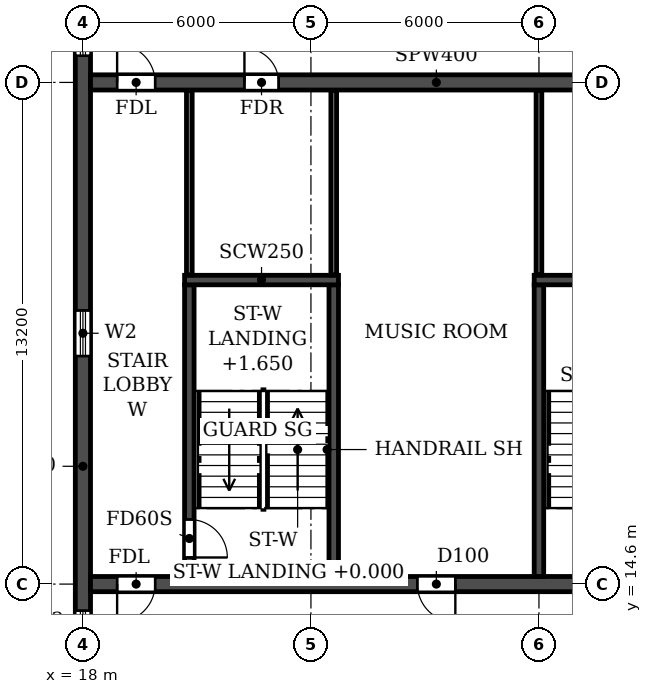
"""IFC4 building model, lengths in metres.
Left out: names, types, materials, properties, quantities, classifications, styles, units other than length and angle.
Written with IfcOpenShell. Run it as: python <this file> out.ifc"""

import sys

from ifc_helpers import new_model, si_unit, direction, frame, frame_2d, origin, place, context, subcontext, project, spatial, rectangle, extrude, element, fill, save


model = new_model("IFC4")
c1 = context("Model", 3, precision=1e-05, world=origin(), true_north=direction((0.0, 1.0)))
c2 = subcontext(c1, "Body", "Model", "MODEL_VIEW")
j1 = project(units=[si_unit("LENGTHUNIT", "METRE"), si_unit("PLANEANGLEUNIT", "RADIAN")], contexts=[c1])
p1 = place(None, origin())
s1 = spatial("IfcSite", under=j1, at=p1, CompositionType="ELEMENT")
p2 = place(p1, origin())
s2 = spatial("IfcBuilding", under=s1, at=p2, CompositionType="ELEMENT")
p3 = place(p2, frame((0.0, 0.0, 171.9)))
s3 = spatial("IfcBuildingStorey", under=s2, at=p3, CompositionType="ELEMENT", Elevation=171.9)
p4 = place(p3, frame((18.0, 4.683, 0.0), z_axis=(0.0, 0.0, 1.0), x_axis=(0.0, 1.0, 0.0)))
e1 = element("IfcWall", 1, at=p4, inside=s3, PredefinedType="SHEAR", context=c2, shape_type="SweptSolid", body=[
    extrude(rectangle(XDim=31.834, YDim=0.4, at=frame_2d((15.917, 0.0))), origin(), (0.0, 0.0, 1.0), 3.08),
])
p5 = place(p4, frame((23.817, 0.0, 0.9)))
e2 = element("IfcOpeningElement", 2, at=p5, cuts=e1, PredefinedType="OPENING", context=c2, shape_type="SweptSolid", body=[
    extrude(rectangle(XDim=1.2, YDim=1.5, at=frame_2d((0.6, 0.75))), frame((0.0, 0.21, 0.0), z_axis=(0.0, -1.0, 0.0), x_axis=(1.0, 0.0, 0.0)), (0.0, 0.0, 1.0), 0.42),
])
p6 = place(p4, frame((8.017, 0.0, 0.9)))
e3 = element("IfcOpeningElement", 3, at=p6, cuts=e1, PredefinedType="OPENING", context=c2, shape_type="SweptSolid", body=[
    extrude(rectangle(XDim=1.2, YDim=1.5, at=frame_2d((0.6, 0.75))), frame((0.0, 0.21, 0.0), z_axis=(0.0, -1.0, 0.0), x_axis=(1.0, 0.0, 0.0)), (0.0, 0.0, 1.0), 0.42),
])
p7 = place(p4, frame((27.694, 0.0, 0.6)))
e4 = element("IfcOpeningElement", 4, at=p7, cuts=e1, PredefinedType="OPENING", context=c2, shape_type="SweptSolid", body=[
    extrude(rectangle(XDim=2.2, YDim=1.8, at=frame_2d((1.1, 0.9))), frame((0.0, 0.21, 0.0), z_axis=(0.0, -1.0, 0.0), x_axis=(1.0, 0.0, 0.0)), (0.0, 0.0, 1.0), 0.42),
])
p8 = place(p4, frame((2.541, 0.0, 0.6)))
e5 = element("IfcOpeningElement", 5, at=p8, cuts=e1, PredefinedType="OPENING", context=c2, shape_type="SweptSolid", body=[
    extrude(rectangle(XDim=2.2, YDim=1.8, at=frame_2d((1.1, 0.9))), frame((0.0, 0.21, 0.0), z_axis=(0.0, -1.0, 0.0), x_axis=(1.0, 0.0, 0.0)), (0.0, 0.0, 1.0), 0.42),
])
p9 = place(p4, frame((15.917, 0.0, 0.9)))
e6 = element("IfcOpeningElement", 6, at=p9, cuts=e1, PredefinedType="OPENING", context=c2, shape_type="SweptSolid", body=[
    extrude(rectangle(XDim=1.2, YDim=1.5, at=frame_2d((0.6, 0.75))), frame((0.0, 0.21, 0.0), z_axis=(0.0, -1.0, 0.0), x_axis=(1.0, 0.0, 0.0)), (0.0, 0.0, 1.0), 0.42),
])
p10 = place(p3, frame((18.2, 14.6, 0.0), z_axis=(0.0, 0.0, 1.0), x_axis=(1.0, 0.0, 0.0)))
e7 = element("IfcWall", 7, at=p10, inside=s3, PredefinedType="SOLIDWALL", context=c2, shape_type="SweptSolid", body=[
    extrude(rectangle(XDim=65.6, YDim=0.4, at=frame_2d((32.8, 0.0))), origin(), (0.0, 0.0, 1.0), 3.08),
])
p11 = place(p10, frame((0.7, 0.0, 0.0)))
e8 = element("IfcOpeningElement", 8, at=p11, cuts=e7, PredefinedType="OPENING", context=c2, shape_type="SweptSolid", body=[
    extrude(rectangle(XDim=1.0, YDim=2.1, at=frame_2d((0.5, 1.05))), frame((0.0, 0.21, 0.0), z_axis=(0.0, -1.0, 0.0), x_axis=(1.0, 0.0, 0.0)), (0.0, 0.0, 1.0), 0.42),
])
p12 = place(p10, frame((8.6, 0.0, 0.0)))
e9 = element("IfcOpeningElement", 9, at=p12, cuts=e7, PredefinedType="OPENING", context=c2, shape_type="SweptSolid", body=[
    extrude(rectangle(XDim=1.0, YDim=2.1, at=frame_2d((0.5, 1.05))), frame((0.0, 0.21, 0.0), z_axis=(0.0, -1.0, 0.0), x_axis=(1.0, 0.0, 0.0)), (0.0, 0.0, 1.0), 0.42),
])
p13 = place(p10, frame((13.2, 0.0, 0.0)))
e10 = element("IfcOpeningElement", 10, at=p13, cuts=e7, PredefinedType="OPENING", context=c2, shape_type="SweptSolid", body=[
    extrude(rectangle(XDim=1.0, YDim=2.1, at=frame_2d((0.5, 1.05))), frame((0.0, 0.21, 0.0), z_axis=(0.0, -1.0, 0.0), x_axis=(1.0, 0.0, 0.0)), (0.0, 0.0, 1.0), 0.42),
])
p14 = place(p10, frame((25.8, 0.0, 0.0)))
e11 = element("IfcOpeningElement", 11, at=p14, cuts=e7, PredefinedType="OPENING", context=c2, shape_type="SweptSolid", body=[
    extrude(rectangle(XDim=1.0, YDim=2.1, at=frame_2d((0.5, 1.05))), frame((0.0, 0.21, 0.0), z_axis=(0.0, -1.0, 0.0), x_axis=(1.0, 0.0, 0.0)), (0.0, 0.0, 1.0), 0.42),
])
p15 = place(p10, frame((29.7, 0.0, 0.0)))
e12 = element("IfcOpeningElement", 12, at=p15, cuts=e7, PredefinedType="OPENING", context=c2, shape_type="SweptSolid", body=[
    extrude(rectangle(XDim=1.0, YDim=2.1, at=frame_2d((0.5, 1.05))), frame((0.0, 0.21, 0.0), z_axis=(0.0, -1.0, 0.0), x_axis=(1.0, 0.0, 0.0)), (0.0, 0.0, 1.0), 0.42),
])
p16 = place(p10, frame((32.3, 0.0, 0.0)))
e13 = element("IfcOpeningElement", 13, at=p16, cuts=e7, PredefinedType="OPENING", context=c2, shape_type="SweptSolid", body=[
    extrude(rectangle(XDim=1.0, YDim=2.1, at=frame_2d((0.5, 1.05))), frame((0.0, 0.21, 0.0), z_axis=(0.0, -1.0, 0.0), x_axis=(1.0, 0.0, 0.0)), (0.0, 0.0, 1.0), 0.42),
])
p17 = place(p10, frame((37.5, 0.0, 0.0)))
e14 = element("IfcOpeningElement", 14, at=p17, cuts=e7, PredefinedType="OPENING", context=c2, shape_type="SweptSolid", body=[
    extrude(rectangle(XDim=1.0, YDim=2.1, at=frame_2d((0.5, 1.05))), frame((0.0, 0.21, 0.0), z_axis=(0.0, -1.0, 0.0), x_axis=(1.0, 0.0, 0.0)), (0.0, 0.0, 1.0), 0.42),
])
p18 = place(p10, frame((51.4, 0.0, 0.0)))
e15 = element("IfcOpeningElement", 15, at=p18, cuts=e7, PredefinedType="OPENING", context=c2, shape_type="SweptSolid", body=[
    extrude(rectangle(XDim=1.0, YDim=2.1, at=frame_2d((0.5, 1.05))), frame((0.0, 0.21, 0.0), z_axis=(0.0, -1.0, 0.0), x_axis=(1.0, 0.0, 0.0)), (0.0, 0.0, 1.0), 0.42),
])
p19 = place(p10, frame((56.0, 0.0, 0.0)))
e16 = element("IfcOpeningElement", 16, at=p19, cuts=e7, PredefinedType="OPENING", context=c2, shape_type="SweptSolid", body=[
    extrude(rectangle(XDim=1.0, YDim=2.1, at=frame_2d((0.5, 1.05))), frame((0.0, 0.21, 0.0), z_axis=(0.0, -1.0, 0.0), x_axis=(1.0, 0.0, 0.0)), (0.0, 0.0, 1.0), 0.42),
])
p20 = place(p10, frame((63.9, 0.0, 0.0)))
e17 = element("IfcOpeningElement", 17, at=p20, cuts=e7, PredefinedType="OPENING", context=c2, shape_type="SweptSolid", body=[
    extrude(rectangle(XDim=1.0, YDim=2.1, at=frame_2d((0.5, 1.05))), frame((0.0, 0.21, 0.0), z_axis=(0.0, -1.0, 0.0), x_axis=(1.0, 0.0, 0.0)), (0.0, 0.0, 1.0), 0.42),
])
p21 = place(p3, frame((18.2, 27.8, 0.0), z_axis=(0.0, 0.0, 1.0), x_axis=(1.0, 0.0, 0.0)))
e18 = element("IfcWall", 18, at=p21, inside=s3, PredefinedType="SOLIDWALL", context=c2, shape_type="SweptSolid", body=[
    extrude(rectangle(XDim=65.6, YDim=0.4, at=frame_2d((32.8, 0.0))), origin(), (0.0, 0.0, 1.0), 3.08),
])
p22 = place(p21, frame((0.7, 0.0, 0.0)))
e19 = element("IfcOpeningElement", 19, at=p22, cuts=e18, PredefinedType="OPENING", context=c2, shape_type="SweptSolid", body=[
    extrude(rectangle(XDim=1.0, YDim=2.1, at=frame_2d((0.5, 1.05))), frame((0.0, 0.21, 0.0), z_axis=(0.0, -1.0, 0.0), x_axis=(1.0, 0.0, 0.0)), (0.0, 0.0, 1.0), 0.42),
])
p23 = place(p21, frame((4.05, 0.0, 0.0)))
e20 = element("IfcOpeningElement", 20, at=p23, cuts=e18, PredefinedType="OPENING", context=c2, shape_type="SweptSolid", body=[
    extrude(rectangle(XDim=0.9, YDim=2.1, at=frame_2d((0.45, 1.05))), frame((0.0, 0.21, 0.0), z_axis=(0.0, -1.0, 0.0), x_axis=(1.0, 0.0, 0.0)), (0.0, 0.0, 1.0), 0.42),
])
p24 = place(p21, frame((13.25, 0.0, 0.0)))
e21 = element("IfcOpeningElement", 21, at=p24, cuts=e18, PredefinedType="OPENING", context=c2, shape_type="SweptSolid", body=[
    extrude(rectangle(XDim=0.9, YDim=2.1, at=frame_2d((0.45, 1.05))), frame((0.0, 0.21, 0.0), z_axis=(0.0, -1.0, 0.0), x_axis=(1.0, 0.0, 0.0)), (0.0, 0.0, 1.0), 0.42),
])
p25 = place(p21, frame((17.7, 0.0, 0.0)))
e22 = element("IfcOpeningElement", 22, at=p25, cuts=e18, PredefinedType="OPENING", context=c2, shape_type="SweptSolid", body=[
    extrude(rectangle(XDim=1.0, YDim=2.1, at=frame_2d((0.5, 1.05))), frame((0.0, 0.21, 0.0), z_axis=(0.0, -1.0, 0.0), x_axis=(1.0, 0.0, 0.0)), (0.0, 0.0, 1.0), 0.42),
])
p26 = place(p21, frame((22.9, 0.0, 0.0)))
e23 = element("IfcOpeningElement", 23, at=p26, cuts=e18, PredefinedType="OPENING", context=c2, shape_type="SweptSolid", body=[
    extrude(rectangle(XDim=1.0, YDim=2.1, at=frame_2d((0.5, 1.05))), frame((0.0, 0.21, 0.0), z_axis=(0.0, -1.0, 0.0), x_axis=(1.0, 0.0, 0.0)), (0.0, 0.0, 1.0), 0.42),
])
p27 = place(p21, frame((29.4, 0.0, 0.0)))
e24 = element("IfcOpeningElement", 24, at=p27, cuts=e18, PredefinedType="OPENING", context=c2, shape_type="SweptSolid", body=[
    extrude(rectangle(XDim=1.0, YDim=2.1, at=frame_2d((0.5, 1.05))), frame((0.0, 0.21, 0.0), z_axis=(0.0, -1.0, 0.0), x_axis=(1.0, 0.0, 0.0)), (0.0, 0.0, 1.0), 0.42),
])
p28 = place(p21, frame((32.3, 0.0, 0.0)))
e25 = element("IfcOpeningElement", 25, at=p28, cuts=e18, PredefinedType="OPENING", context=c2, shape_type="SweptSolid", body=[
    extrude(rectangle(XDim=1.0, YDim=2.1, at=frame_2d((0.5, 1.05))), frame((0.0, 0.21, 0.0), z_axis=(0.0, -1.0, 0.0), x_axis=(1.0, 0.0, 0.0)), (0.0, 0.0, 1.0), 0.42),
])
p29 = place(p21, frame((36.5, 0.0, 0.0)))
e26 = element("IfcOpeningElement", 26, at=p29, cuts=e18, PredefinedType="OPENING", context=c2, shape_type="SweptSolid", body=[
    extrude(rectangle(XDim=1.0, YDim=2.1, at=frame_2d((0.5, 1.05))), frame((0.0, 0.21, 0.0), z_axis=(0.0, -1.0, 0.0), x_axis=(1.0, 0.0, 0.0)), (0.0, 0.0, 1.0), 0.42),
])
p30 = place(p21, frame((41.7, 0.0, 0.0)))
e27 = element("IfcOpeningElement", 27, at=p30, cuts=e18, PredefinedType="OPENING", context=c2, shape_type="SweptSolid", body=[
    extrude(rectangle(XDim=1.0, YDim=2.1, at=frame_2d((0.5, 1.05))), frame((0.0, 0.21, 0.0), z_axis=(0.0, -1.0, 0.0), x_axis=(1.0, 0.0, 0.0)), (0.0, 0.0, 1.0), 0.42),
])
p31 = place(p21, frame((45.6, 0.0, 0.0)))
e28 = element("IfcOpeningElement", 28, at=p31, cuts=e18, PredefinedType="OPENING", context=c2, shape_type="SweptSolid", body=[
    extrude(rectangle(XDim=1.0, YDim=2.1, at=frame_2d((0.5, 1.05))), frame((0.0, 0.21, 0.0), z_axis=(0.0, -1.0, 0.0), x_axis=(1.0, 0.0, 0.0)), (0.0, 0.0, 1.0), 0.42),
])
p32 = place(p21, frame((48.2, 0.0, 0.0)))
e29 = element("IfcOpeningElement", 29, at=p32, cuts=e18, PredefinedType="OPENING", context=c2, shape_type="SweptSolid", body=[
    extrude(rectangle(XDim=1.0, YDim=2.1, at=frame_2d((0.5, 1.05))), frame((0.0, 0.21, 0.0), z_axis=(0.0, -1.0, 0.0), x_axis=(1.0, 0.0, 0.0)), (0.0, 0.0, 1.0), 0.42),
])
p33 = place(p21, frame((51.45, 0.0, 0.0)))
e30 = element("IfcOpeningElement", 30, at=p33, cuts=e18, PredefinedType="OPENING", context=c2, shape_type="SweptSolid", body=[
    extrude(rectangle(XDim=0.9, YDim=2.1, at=frame_2d((0.45, 1.05))), frame((0.0, 0.21, 0.0), z_axis=(0.0, -1.0, 0.0), x_axis=(1.0, 0.0, 0.0)), (0.0, 0.0, 1.0), 0.42),
])
p34 = place(p21, frame((60.65, 0.0, 0.0)))
e31 = element("IfcOpeningElement", 31, at=p34, cuts=e18, PredefinedType="OPENING", context=c2, shape_type="SweptSolid", body=[
    extrude(rectangle(XDim=0.9, YDim=2.1, at=frame_2d((0.45, 1.05))), frame((0.0, 0.21, 0.0), z_axis=(0.0, -1.0, 0.0), x_axis=(1.0, 0.0, 0.0)), (0.0, 0.0, 1.0), 0.42),
])
p35 = place(p21, frame((63.9, 0.0, 0.0)))
e32 = element("IfcOpeningElement", 32, at=p35, cuts=e18, PredefinedType="OPENING", context=c2, shape_type="SweptSolid", body=[
    extrude(rectangle(XDim=1.0, YDim=2.1, at=frame_2d((0.5, 1.05))), frame((0.0, 0.21, 0.0), z_axis=(0.0, -1.0, 0.0), x_axis=(1.0, 0.0, 0.0)), (0.0, 0.0, 1.0), 0.42),
])
p36 = place(p3, frame((30.0, 14.8, 0.0), z_axis=(0.0, 0.0, 1.0), x_axis=(0.0, 1.0, 0.0)))
e33 = element("IfcWall", 33, at=p36, inside=s3, PredefinedType="SOLIDWALL", context=c2, shape_type="SweptSolid", body=[
    extrude(rectangle(XDim=7.675, YDim=0.25, at=frame_2d((3.837, 0.0))), origin(), (0.0, 0.0, 1.0), 3.08),
])
p37 = place(p3, frame((29.875, 22.6, 0.0), z_axis=(0.0, 0.0, 1.0), x_axis=(1.0, 0.0, 0.0)))
e34 = element("IfcWall", 34, at=p37, inside=s3, PredefinedType="SOLIDWALL", context=c2, shape_type="SweptSolid", body=[
    extrude(rectangle(XDim=4.05, YDim=0.25, at=frame_2d((2.025, 0.0))), origin(), (0.0, 0.0, 1.0), 3.08),
])
p38 = place(p3, frame((20.8, 14.8, 0.0), z_axis=(0.0, 0.0, 1.0), x_axis=(0.0, 1.0, 0.0)))
e35 = element("IfcWall", 35, at=p38, inside=s3, PredefinedType="SOLIDWALL", context=c2, shape_type="SweptSolid", body=[
    extrude(rectangle(XDim=7.675, YDim=0.25, at=frame_2d((3.837, 0.0))), origin(), (0.0, 0.0, 1.0), 3.08),
])
p39 = place(p38, frame((0.5, 0.0, 0.0)))
e36 = element("IfcOpeningElement", 36, at=p39, cuts=e35, PredefinedType="OPENING", context=c2, shape_type="SweptSolid", body=[
    extrude(rectangle(XDim=1.0, YDim=2.1, at=frame_2d((0.5, 1.05))), frame((0.0, 0.135, 0.0), z_axis=(0.0, -1.0, 0.0), x_axis=(1.0, 0.0, 0.0)), (0.0, 0.0, 1.0), 0.27),
])
p40 = place(p3, frame((24.6, 14.8, 0.0), z_axis=(0.0, 0.0, 1.0), x_axis=(0.0, 1.0, 0.0)))
e37 = element("IfcWall", 37, at=p40, inside=s3, PredefinedType="SOLIDWALL", context=c2, shape_type="SweptSolid", body=[
    extrude(rectangle(XDim=7.675, YDim=0.25, at=frame_2d((3.837, 0.0))), origin(), (0.0, 0.0, 1.0), 3.08),
])
p41 = place(p3, frame((20.675, 22.6, 0.0), z_axis=(0.0, 0.0, 1.0), x_axis=(1.0, 0.0, 0.0)))
e38 = element("IfcWall", 38, at=p41, inside=s3, PredefinedType="SOLIDWALL", context=c2, shape_type="SweptSolid", body=[
    extrude(rectangle(XDim=4.05, YDim=0.25, at=frame_2d((2.025, 0.0))), origin(), (0.0, 0.0, 1.0), 3.08),
])
for number, where, z_axis, x_axis in (
    (39, (20.8, 22.735, 0.0), (0.0, 0.0, 1.0), (0.0, 1.0, 0.0)),
    (40, (24.6, 22.735, 0.0), (0.0, 0.0, 1.0), (0.0, 1.0, 0.0)),
    (41, (30.0, 22.735, 0.0), (0.0, 0.0, 1.0), (0.0, 1.0, 0.0)),
):
    element("IfcWall", number, at=place(p3, frame(where, z_axis=z_axis, x_axis=x_axis)), inside=s3, PredefinedType="PARTITIONING", context=c2, shape_type="SweptSolid", body=[
        extrude(rectangle(XDim=4.855, YDim=0.15, at=frame_2d((2.427, 0.0))), origin(), (0.0, 0.0, 1.0), 3.08),
    ])
p42 = place(p5, origin())
e42 = element("IfcWindow", 42, at=p42, inside=s3, PartitioningType="SINGLE_PANEL", PredefinedType="WINDOW", context=c2, shape_type="SweptSolid", body=[
    extrude(rectangle(XDim=1.2, YDim=1.5, at=frame_2d((0.6, 0.75))), frame((0.0, 0.03, 0.0), z_axis=(0.0, -1.0, 0.0), x_axis=(1.0, 0.0, 0.0)), (0.0, 0.0, 1.0), 0.06),
])
fill(e2, e42)
p43 = place(p6, origin())
e43 = element("IfcWindow", 43, at=p43, inside=s3, PartitioningType="SINGLE_PANEL", PredefinedType="WINDOW", context=c2, shape_type="SweptSolid", body=[
    extrude(rectangle(XDim=1.2, YDim=1.5, at=frame_2d((0.6, 0.75))), frame((0.0, 0.03, 0.0), z_axis=(0.0, -1.0, 0.0), x_axis=(1.0, 0.0, 0.0)), (0.0, 0.0, 1.0), 0.06),
])
fill(e3, e43)
p44 = place(p9, origin())
e44 = element("IfcWindow", 44, at=p44, inside=s3, PartitioningType="SINGLE_PANEL", PredefinedType="WINDOW", context=c2, shape_type="SweptSolid", body=[
    extrude(rectangle(XDim=1.2, YDim=1.5, at=frame_2d((0.6, 0.75))), frame((0.0, 0.03, 0.0), z_axis=(0.0, -1.0, 0.0), x_axis=(1.0, 0.0, 0.0)), (0.0, 0.0, 1.0), 0.06),
])
fill(e6, e44)
p45 = place(p22, origin())
e45 = element("IfcDoor", 45, at=p45, inside=s3, OperationType="SINGLE_SWING_LEFT", PredefinedType="DOOR", context=c2, shape_type="SweptSolid", body=[
    extrude(rectangle(XDim=1.0, YDim=2.1, at=frame_2d((0.5, 1.05))), frame((0.0, 0.025, 0.0), z_axis=(0.0, -1.0, 0.0), x_axis=(1.0, 0.0, 0.0)), (0.0, 0.0, 1.0), 0.05),
])
fill(e19, e45)
p46 = place(p23, origin())
e46 = element("IfcDoor", 46, at=p46, inside=s3, OperationType="SINGLE_SWING_LEFT", PredefinedType="DOOR", context=c2, shape_type="SweptSolid", body=[
    extrude(rectangle(XDim=0.9, YDim=2.1, at=frame_2d((0.45, 1.05))), frame((0.0, 0.025, 0.0), z_axis=(0.0, -1.0, 0.0), x_axis=(1.0, 0.0, 0.0)), (0.0, 0.0, 1.0), 0.05),
])
fill(e20, e46)
p47 = place(p11, frame((1.0, 0.0, 0.0), z_axis=(0.0, 0.0, 1.0), x_axis=(-1.0, 0.0, 0.0)))
e47 = element("IfcDoor", 47, at=p47, inside=s3, OperationType="SINGLE_SWING_RIGHT", PredefinedType="DOOR", context=c2, shape_type="SweptSolid", body=[
    extrude(rectangle(XDim=1.0, YDim=2.1, at=frame_2d((0.5, 1.05))), frame((0.0, 0.025, 0.0), z_axis=(0.0, -1.0, 0.0), x_axis=(1.0, 0.0, 0.0)), (0.0, 0.0, 1.0), 0.05),
])
fill(e8, e47)
p48 = place(p12, frame((1.0, 0.0, 0.0), z_axis=(0.0, 0.0, 1.0), x_axis=(-1.0, 0.0, 0.0)))
e48 = element("IfcDoor", 48, at=p48, inside=s3, OperationType="SINGLE_SWING_LEFT", PredefinedType="DOOR", context=c2, shape_type="SweptSolid", body=[
    extrude(rectangle(XDim=1.0, YDim=2.1, at=frame_2d((0.5, 1.05))), frame((0.0, 0.025, 0.0), z_axis=(0.0, -1.0, 0.0), x_axis=(1.0, 0.0, 0.0)), (0.0, 0.0, 1.0), 0.05),
])
fill(e9, e48)
p49 = place(p39, frame((1.0, 0.0, 0.0), z_axis=(0.0, 0.0, 1.0), x_axis=(-1.0, 0.0, 0.0)))
e49 = element("IfcDoor", 49, at=p49, inside=s3, OperationType="SINGLE_SWING_RIGHT", PredefinedType="DOOR", context=c2, shape_type="SweptSolid", body=[
    extrude(rectangle(XDim=1.0, YDim=2.1, at=frame_2d((0.5, 1.05))), frame((0.0, 0.025, 0.0), z_axis=(0.0, -1.0, 0.0), x_axis=(1.0, 0.0, 0.0)), (0.0, 0.0, 1.0), 0.05),
])
fill(e36, e49)
save(model, sys.argv[1])
